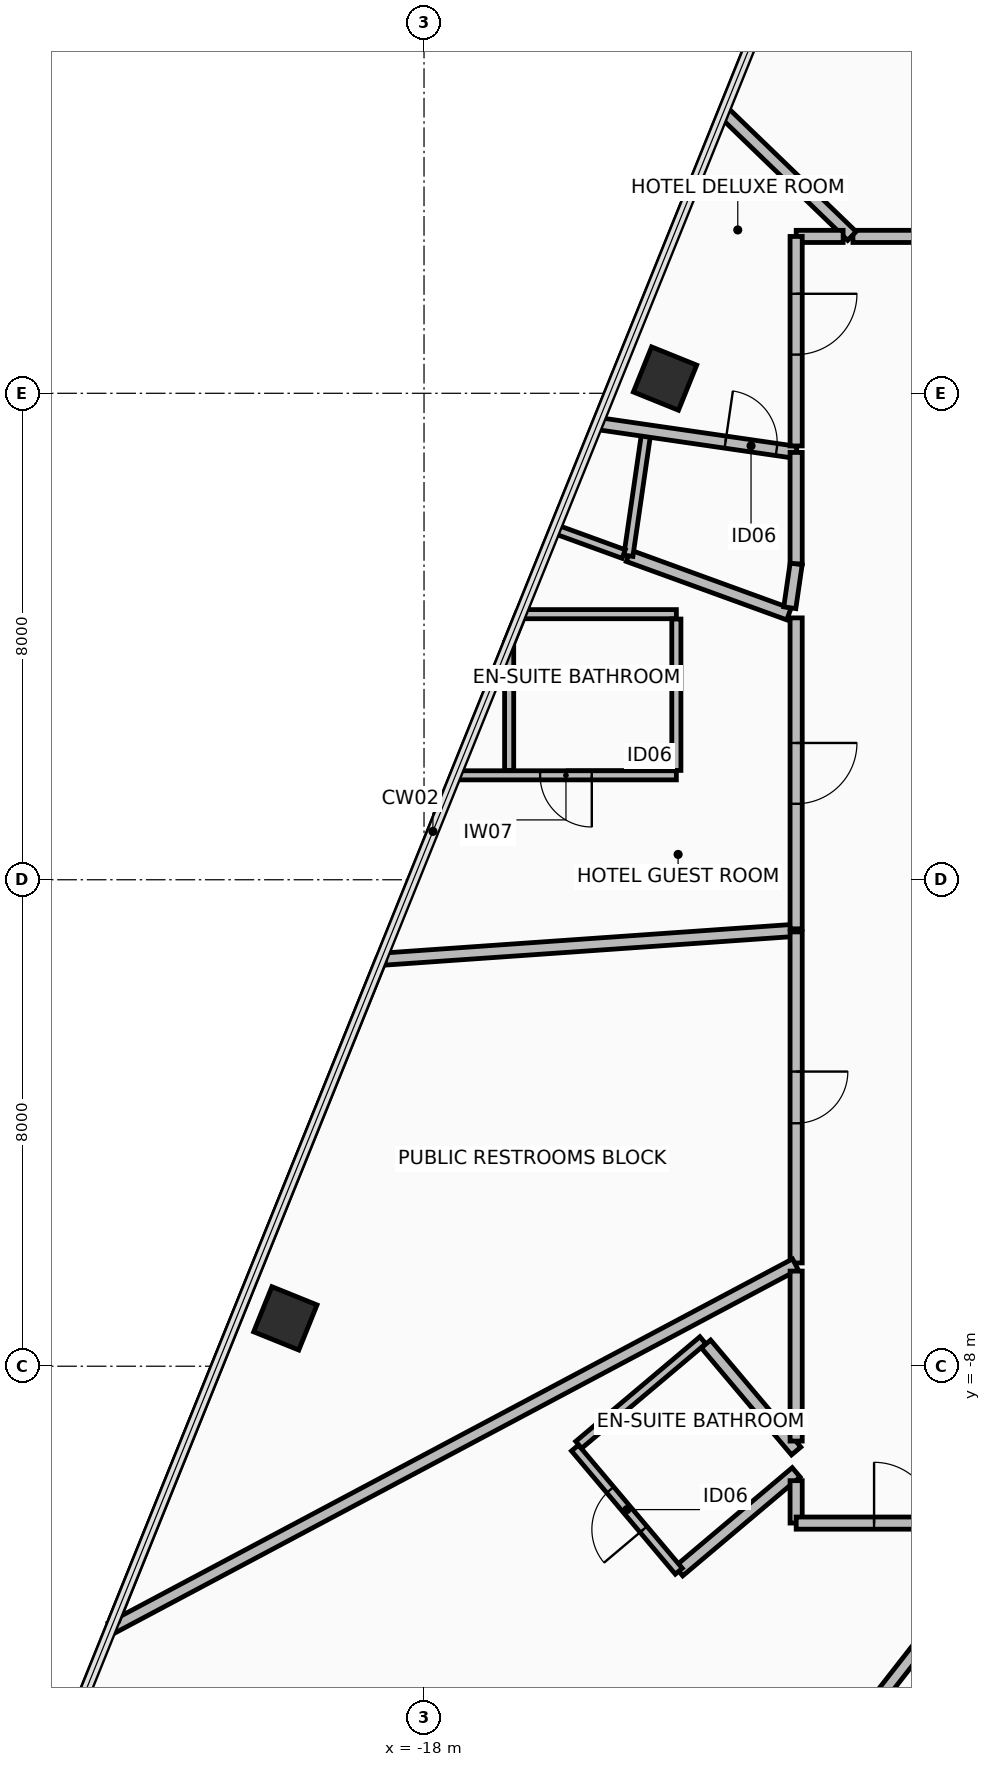
"""IFC4 building model, lengths in metres.
Left out: names, types, materials, properties, quantities, classifications, styles, units other than length and angle.
Written with IfcOpenShell. Run it as: python <this file> out.ifc"""

import sys

from ifc_helpers import new_model, si_unit, direction, frame, frame_2d, origin, origin_2d, place, context, subcontext, project, spatial, rectangle, hollow_rectangle, extrude, element, fill, save


model = new_model("IFC4")
c1 = context("Model", 3, precision=1e-05, world=origin(), true_north=direction((0.0, 1.0)))
c2 = subcontext(c1, "Body", "Model", "MODEL_VIEW")
j1 = project(units=[si_unit("LENGTHUNIT", "METRE"), si_unit("PLANEANGLEUNIT", "RADIAN")], contexts=[c1])
p1 = place(None, origin())
s1 = spatial("IfcSite", under=j1, at=p1, CompositionType="ELEMENT")
p2 = place(p1, origin())
s2 = spatial("IfcBuilding", under=s1, at=p2, CompositionType="ELEMENT")
p3 = place(p2, frame((0.0, 0.0, 77.65)))
s3 = spatial("IfcBuildingStorey", under=s2, at=p3, CompositionType="ELEMENT", Elevation=77.65)
for number, where, z_axis, x_axis in (
    (1, (-14.036, 8.242, 0.0), (0.0, 0.0, 1.0), (0.375, 0.927, 0.0)),
    (2, (-20.281, -7.213, 0.0), (0.0, 0.0, 1.0), (0.375, 0.927, 0.0)),
):
    element("IfcColumn", number, at=place(p3, frame(where, z_axis=z_axis, x_axis=x_axis)), inside=s3, PredefinedType="COLUMN", context=c2, shape_type="SweptSolid", body=[
        extrude(hollow_rectangle(XDim=0.8, YDim=0.8, WallThickness=0.045, at=origin_2d()), origin(), (0.0, 0.0, 1.0), 3.45),
    ])
p4 = place(p3, frame((-12.0, 4.368, 0.0), z_axis=(0.0, 0.0, 1.0), x_axis=(-0.939689330019, 0.342029184499, 0.0)))
e3 = element("IfcWall", 3, at=p4, inside=s3, PredefinedType="PARTITIONING", context=c2, shape_type="SweptSolid", body=[
    extrude(rectangle(XDim=2.809, YDim=0.2, at=frame_2d((1.404, 0.0))), origin(), (0.0, 0.0, 1.0), 2.805),
])
p5 = place(p3, frame((-14.639, 5.328, 0.0), z_axis=(0.0, 0.0, 1.0), x_axis=(0.143755820494, 0.989613189117, 0.0)))
e4 = element("IfcWall", 4, at=p5, inside=s3, PredefinedType="PARTITIONING", context=c2, shape_type="SweptSolid", body=[
    extrude(rectangle(XDim=2.079, YDim=0.15, at=frame_2d((1.039, 0.0))), origin(), (0.0, 0.0, 1.0), 2.405),
])
p6 = place(p3, frame((-15.144, 7.502, 0.0), z_axis=(0.0, 0.0, 1.0), x_axis=(0.989616702709, -0.143731630892, 0.0)))
e5 = element("IfcWall", 5, at=p6, inside=s3, PredefinedType="PARTITIONING", context=c2, shape_type="SweptSolid", body=[
    extrude(rectangle(XDim=3.299, YDim=0.2, at=frame_2d((1.649, 0.0))), origin(), (0.0, 0.0, 1.0), 2.405),
])
p7 = place(p6, frame((2.124, 0.0, 0.0)))
e6 = element("IfcOpeningElement", 6, at=p7, cuts=e5, PredefinedType="OPENING", context=c2, shape_type="SweptSolid", body=[
    extrude(rectangle(XDim=0.85, YDim=2.1, at=frame_2d((0.425, 1.05))), frame((0.0, 0.11, 0.0), z_axis=(0.0, -1.0, 0.0), x_axis=(1.0, 0.0, 0.0)), (0.0, 0.0, 1.0), 0.22),
])
p8 = place(p3, frame((-11.88, 7.028, 0.0), z_axis=(0.0, 0.0, 1.0), x_axis=(0.0, -1.0, 0.0)))
e7 = element("IfcWall", 7, at=p8, inside=s3, PredefinedType="PARTITIONING", context=c2, shape_type="SweptSolid", body=[
    extrude(rectangle(XDim=1.834, YDim=0.2, at=frame_2d((0.917, 0.0))), origin(), (0.0, 0.0, 1.0), 2.805),
])
p9 = place(p3, frame((-11.88, 5.194, 0.0), z_axis=(0.0, 0.0, 1.0), x_axis=(-0.143909981619, -0.989590782693, 0.0)))
e8 = element("IfcWall", 8, at=p9, inside=s3, PredefinedType="PARTITIONING", context=c2, shape_type="SweptSolid", body=[
    extrude(rectangle(XDim=0.728, YDim=0.2, at=frame_2d((0.364, 0.0))), origin(), (0.0, 0.0, 1.0), 3.21),
])
p10 = place(p3, frame((-13.85, 1.718, 0.0), z_axis=(0.0, 0.0, 1.0), x_axis=(-1.0, 0.0, 0.0)))
e9 = element("IfcWall", 9, at=p10, inside=s3, PredefinedType="PARTITIONING", context=c2, shape_type="SweptSolid", body=[
    extrude(rectangle(XDim=3.631, YDim=0.15, at=frame_2d((1.816, 0.0))), origin(), (0.0, 0.0, 1.0), 2.405),
])
p11 = place(p10, frame((1.391, 0.0, 0.0)))
e10 = element("IfcOpeningElement", 10, at=p11, cuts=e9, PredefinedType="OPENING", context=c2, shape_type="SweptSolid", body=[
    extrude(rectangle(XDim=0.85, YDim=2.1, at=frame_2d((0.425, 1.05))), frame((0.0, 0.085, 0.0), z_axis=(0.0, -1.0, 0.0), x_axis=(1.0, 0.0, 0.0)), (0.0, 0.0, 1.0), 0.17),
])
p12 = place(p3, frame((-16.6, 1.798, 0.0), z_axis=(0.0, 0.0, 1.0), x_axis=(0.0, 1.0, 0.0)))
e11 = element("IfcWall", 11, at=p12, inside=s3, PredefinedType="PARTITIONING", context=c2, shape_type="SweptSolid", body=[
    extrude(rectangle(XDim=2.102, YDim=0.15, at=frame_2d((1.051, 0.0))), origin(), (0.0, 0.0, 1.0), 2.405),
])
p13 = place(p3, frame((-16.6, 3.899, 0.0), z_axis=(0.0, 0.0, 1.0), x_axis=(0.374886357565, 0.92707077341, 0.0)))
e12 = element("IfcWall", 12, at=p13, inside=s3, PredefinedType="PARTITIONING", context=c2, shape_type="SweptSolid", body=[
    extrude(rectangle(XDim=0.505, YDim=0.15, at=frame_2d((0.253, 0.0))), origin(), (0.0, 0.0, 1.0), 3.21),
])
p14 = place(p3, frame((-16.411, 4.368, 0.0), z_axis=(0.0, 0.0, 1.0), x_axis=(1.0, 0.0, 0.0)))
e13 = element("IfcWall", 13, at=p14, inside=s3, PredefinedType="PARTITIONING", context=c2, shape_type="SweptSolid", body=[
    extrude(rectangle(XDim=2.561, YDim=0.15, at=frame_2d((1.28, 0.0))), origin(), (0.0, 0.0, 1.0), 2.405),
])
p15 = place(p3, frame((-13.85, 4.288, 0.0), z_axis=(0.0, 0.0, 1.0), x_axis=(0.0, -1.0, 0.0)))
e14 = element("IfcWall", 14, at=p15, inside=s3, PredefinedType="PARTITIONING", context=c2, shape_type="SweptSolid", body=[
    extrude(rectangle(XDim=2.49, YDim=0.15, at=frame_2d((1.245, 0.0))), origin(), (0.0, 0.0, 1.0), 3.21),
])
p16 = place(p3, frame((-11.88, -9.745, 0.0), z_axis=(0.0, 0.0, 1.0), x_axis=(-0.764712982519, -0.644371053328, 0.0)))
e15 = element("IfcWall", 15, at=p16, inside=s3, PredefinedType="PARTITIONING", context=c2, shape_type="SweptSolid", body=[
    extrude(rectangle(XDim=2.524, YDim=0.2, at=frame_2d((1.262, 0.0))), origin(), (0.0, 0.0, 1.0), 3.21),
])
p17 = place(p3, frame((-13.81, -11.371, 0.0), z_axis=(0.0, 0.0, 1.0), x_axis=(-0.644478981733, 0.764622025647, 0.0)))
e16 = element("IfcWall", 16, at=p17, inside=s3, PredefinedType="PARTITIONING", context=c2, shape_type="SweptSolid", body=[
    extrude(rectangle(XDim=2.65, YDim=0.15, at=frame_2d((1.325, 0.0))), origin(), (0.0, 0.0, 1.0), 2.805),
])
p18 = place(p17, frame((0.9, 0.0, 0.0)))
e17 = element("IfcOpeningElement", 17, at=p18, cuts=e16, PredefinedType="OPENING", context=c2, shape_type="SweptSolid", body=[
    extrude(rectangle(XDim=0.85, YDim=2.1, at=frame_2d((0.425, 1.05))), frame((0.0, 0.085, 0.0), z_axis=(0.0, -1.0, 0.0), x_axis=(1.0, 0.0, 0.0)), (0.0, 0.0, 1.0), 0.17),
])
p19 = place(p3, frame((-15.456, -9.293, 0.0), z_axis=(0.0, 0.0, 1.0), x_axis=(0.764709608169, 0.644375057846, 0.0)))
e18 = element("IfcWall", 18, at=p19, inside=s3, PredefinedType="PARTITIONING", context=c2, shape_type="SweptSolid", body=[
    extrude(rectangle(XDim=2.67, YDim=0.15, at=frame_2d((1.335, 0.0))), origin(), (0.0, 0.0, 1.0), 2.605),
])
p20 = place(p3, frame((-13.363, -7.634, 0.0), z_axis=(0.0, 0.0, 1.0), x_axis=(0.644400290836, -0.764688345125, 0.0)))
e19 = element("IfcWall", 19, at=p20, inside=s3, PredefinedType="PARTITIONING", context=c2, shape_type="SweptSolid", body=[
    extrude(rectangle(XDim=2.302, YDim=0.2, at=frame_2d((1.151, 0.0))), origin(), (0.0, 0.0, 1.0), 2.605),
])
p21 = place(p3, frame((-18.688, -1.307, 0.0), z_axis=(0.0, 0.0, 1.0), x_axis=(0.997562443225, 0.069779451603, 0.0)))
e20 = element("IfcWall", 20, at=p21, inside=s3, PredefinedType="PARTITIONING", context=c2, shape_type="SweptSolid", body=[
    extrude(rectangle(XDim=6.798, YDim=0.2, at=frame_2d((3.399, 0.0))), origin(), (0.0, 0.0, 1.0), 2.405),
])
p22 = place(p3, frame((-11.88, -0.857, 0.0), z_axis=(0.0, 0.0, 1.0), x_axis=(0.0, -1.0, 0.0)))
e21 = element("IfcWall", 21, at=p22, inside=s3, PredefinedType="PARTITIONING", context=c2, shape_type="SweptSolid", body=[
    extrude(rectangle(XDim=5.444, YDim=0.2, at=frame_2d((2.722, 0.0))), origin(), (0.0, 0.0, 1.0), 3.21),
])
p23 = place(p22, frame((2.297, 0.0, 0.0)))
e22 = element("IfcOpeningElement", 22, at=p23, cuts=e21, PredefinedType="OPENING", context=c2, shape_type="SweptSolid", body=[
    extrude(rectangle(XDim=0.85, YDim=2.1, at=frame_2d((0.425, 1.05))), frame((0.0, 0.11, 0.0), z_axis=(0.0, -1.0, 0.0), x_axis=(1.0, 0.0, 0.0)), (0.0, 0.0, 1.0), 0.22),
])
p24 = place(p3, frame((-11.893, -6.324, 0.0), z_axis=(0.0, 0.0, 1.0), x_axis=(-0.882946043117, -0.469474477416, 0.0)))
e23 = element("IfcWall", 23, at=p24, inside=s3, PredefinedType="PARTITIONING", context=c2, shape_type="SweptSolid", body=[
    extrude(rectangle(XDim=12.747, YDim=0.2, at=frame_2d((6.374, 0.0))), origin(), (0.0, 0.0, 1.0), 2.405),
])
p25 = place(p3, frame((-23.087, -12.156, 0.0), z_axis=(0.0, 0.0, 1.0), x_axis=(0.374605375648, 0.927184346576, 0.0)))
e24 = element("IfcWall", 24, at=p25, inside=s3, PredefinedType="PARTITIONING", context=c2, shape_type="SweptSolid", body=[
    extrude(rectangle(XDim=11.685, YDim=0.15, at=frame_2d((5.842, 0.0))), origin(), (0.0, 0.0, 1.0), 3.21),
])
p26 = place(p3, frame((-4.312, 10.58, 0.0), z_axis=(0.0, 0.0, 1.0), x_axis=(-1.0, 0.0, 0.0)))
e25 = element("IfcWall", 25, at=p26, inside=s3, PredefinedType="PARTITIONING", context=c2, shape_type="SweptSolid", body=[
    extrude(rectangle(XDim=6.634, YDim=0.2, at=frame_2d((3.317, 0.0))), origin(), (0.0, 0.0, 1.0), 2.605),
])
p27 = place(p26, frame((2.817, 0.0, 0.0)))
e26 = element("IfcOpeningElement", 26, at=p27, cuts=e25, PredefinedType="OPENING", context=c2, shape_type="SweptSolid", body=[
    extrude(rectangle(XDim=1.0, YDim=2.15, at=frame_2d((0.5, 1.075))), frame((0.0, 0.11, 0.0), z_axis=(0.0, -1.0, 0.0), x_axis=(1.0, 0.0, 0.0)), (0.0, 0.0, 1.0), 0.22),
])
p28 = place(p3, frame((-10.963, 10.587, 0.0), z_axis=(0.0, 0.0, 1.0), x_axis=(-0.719299093908, 0.69470052073, 0.0)))
e27 = element("IfcWall", 27, at=p28, inside=s3, PredefinedType="PARTITIONING", context=c2, shape_type="SweptSolid", body=[
    extrude(rectangle(XDim=2.918, YDim=0.2, at=frame_2d((1.459, 0.0))), origin(), (0.0, 0.0, 1.0), 2.405),
])
p29 = place(p3, frame((-11.107, 10.58, 0.0), z_axis=(0.0, 0.0, 1.0), x_axis=(-1.0, 0.0, 0.0)))
e28 = element("IfcWall", 28, at=p29, inside=s3, PredefinedType="PARTITIONING", context=c2, shape_type="SweptSolid", body=[
    extrude(rectangle(XDim=0.772, YDim=0.2, at=frame_2d((0.386, 0.0))), origin(), (0.0, 0.0, 1.0), 3.21),
])
p30 = place(p3, frame((-11.88, 10.579, 0.0), z_axis=(0.0, 0.0, 1.0), x_axis=(0.0, -1.0, 0.0)))
e29 = element("IfcWall", 29, at=p30, inside=s3, PredefinedType="PARTITIONING", context=c2, shape_type="SweptSolid", body=[
    extrude(rectangle(XDim=3.445, YDim=0.2, at=frame_2d((1.723, 0.0))), origin(), (0.0, 0.0, 1.0), 2.605),
])
p31 = place(p30, frame((0.943, 0.0, 0.0)))
e30 = element("IfcOpeningElement", 30, at=p31, cuts=e29, PredefinedType="OPENING", context=c2, shape_type="SweptSolid", body=[
    extrude(rectangle(XDim=1.0, YDim=2.15, at=frame_2d((0.5, 1.075))), frame((0.0, 0.11, 0.0), z_axis=(0.0, -1.0, 0.0), x_axis=(1.0, 0.0, 0.0)), (0.0, 0.0, 1.0), 0.22),
])
p32 = place(p3, frame((-14.716, 5.356, 0.0), z_axis=(0.0, 0.0, 1.0), x_axis=(-0.939690305464, 0.342026504552, 0.0)))
e31 = element("IfcWall", 31, at=p32, inside=s3, PredefinedType="PARTITIONING", context=c2, shape_type="SweptSolid", body=[
    extrude(rectangle(XDim=1.176, YDim=0.15, at=frame_2d((0.588, 0.0))), origin(), (0.0, 0.0, 1.0), 2.405),
])
p33 = place(p3, frame((-11.88, 4.306, 0.0), z_axis=(0.0, 0.0, 1.0), x_axis=(0.0, -1.0, 0.0)))
e32 = element("IfcWall", 32, at=p33, inside=s3, PredefinedType="PARTITIONING", context=c2, shape_type="SweptSolid", body=[
    extrude(rectangle(XDim=5.114, YDim=0.2, at=frame_2d((2.557, 0.0))), origin(), (0.0, 0.0, 1.0), 3.21),
])
p34 = place(p33, frame((2.057, 0.0, 0.0)))
e33 = element("IfcOpeningElement", 33, at=p34, cuts=e32, PredefinedType="OPENING", context=c2, shape_type="SweptSolid", body=[
    extrude(rectangle(XDim=1.0, YDim=2.15, at=frame_2d((0.5, 1.075))), frame((0.0, 0.11, 0.0), z_axis=(0.0, -1.0, 0.0), x_axis=(1.0, 0.0, 0.0)), (0.0, 0.0, 1.0), 0.22),
])
p35 = place(p3, frame((-11.88, -6.436, 0.0), z_axis=(0.0, 0.0, 1.0), x_axis=(0.0, -1.0, 0.0)))
e34 = element("IfcWall", 34, at=p35, inside=s3, PredefinedType="PARTITIONING", context=c2, shape_type="SweptSolid", body=[
    extrude(rectangle(XDim=2.795, YDim=0.2, at=frame_2d((1.397, 0.0))), origin(), (0.0, 0.0, 1.0), 2.605),
])
p36 = place(p3, frame((-11.88, -9.882, 0.0), z_axis=(0.0, 0.0, 1.0), x_axis=(0.0, -1.0, 0.0)))
e35 = element("IfcWall", 35, at=p36, inside=s3, PredefinedType="PARTITIONING", context=c2, shape_type="SweptSolid", body=[
    extrude(rectangle(XDim=0.697, YDim=0.2, at=frame_2d((0.349, 0.0))), origin(), (0.0, 0.0, 1.0), 2.605),
])
p37 = place(p3, frame((-11.879, -10.58, 0.0), z_axis=(0.0, 0.0, 1.0), x_axis=(1.0, 0.0, 0.0)))
e36 = element("IfcWall", 36, at=p37, inside=s3, PredefinedType="PARTITIONING", context=c2, shape_type="SweptSolid", body=[
    extrude(rectangle(XDim=3.562, YDim=0.2, at=frame_2d((1.781, 0.0))), origin(), (0.0, 0.0, 1.0), 2.605),
])
p38 = place(p37, frame((1.281, 0.0, 0.0)))
e37 = element("IfcOpeningElement", 37, at=p38, cuts=e36, PredefinedType="OPENING", context=c2, shape_type="SweptSolid", body=[
    extrude(rectangle(XDim=1.0, YDim=2.15, at=frame_2d((0.5, 1.075))), frame((0.0, 0.11, 0.0), z_axis=(0.0, -1.0, 0.0), x_axis=(1.0, 0.0, 0.0)), (0.0, 0.0, 1.0), 0.22),
])
p39 = place(p3, frame((-8.348, -10.685, 0.0), z_axis=(0.0, 0.0, 1.0), x_axis=(-0.615661230884, -0.788010944585, 0.0)))
e38 = element("IfcWall", 38, at=p39, inside=s3, PredefinedType="PARTITIONING", context=c2, shape_type="SweptSolid", body=[
    extrude(rectangle(XDim=20.121, YDim=0.2, at=frame_2d((10.06, 0.0))), origin(), (0.0, 0.0, 1.0), 2.405),
])
p40 = place(p7, origin())
e39 = element("IfcDoor", 39, at=p40, inside=s3, OperationType="SINGLE_SWING_RIGHT", PredefinedType="DOOR", context=c2, shape_type="SweptSolid", body=[
    extrude(rectangle(XDim=0.85, YDim=2.1, at=frame_2d((0.425, 1.05))), frame((0.0, 0.025, 0.0), z_axis=(0.0, -1.0, 0.0), x_axis=(1.0, 0.0, 0.0)), (0.0, 0.0, 1.0), 0.05),
])
fill(e6, e39)
p41 = place(p11, origin())
e40 = element("IfcDoor", 40, at=p41, inside=s3, OperationType="SINGLE_SWING_RIGHT", PredefinedType="DOOR", context=c2, shape_type="SweptSolid", body=[
    extrude(rectangle(XDim=0.85, YDim=2.1, at=frame_2d((0.425, 1.05))), frame((0.0, 0.025, 0.0), z_axis=(0.0, -1.0, 0.0), x_axis=(1.0, 0.0, 0.0)), (0.0, 0.0, 1.0), 0.05),
])
fill(e10, e40)
p42 = place(p18, origin())
e41 = element("IfcDoor", 41, at=p42, inside=s3, OperationType="SINGLE_SWING_RIGHT", PredefinedType="DOOR", context=c2, shape_type="SweptSolid", body=[
    extrude(rectangle(XDim=0.85, YDim=2.1, at=frame_2d((0.425, 1.05))), frame((0.0, 0.025, 0.0), z_axis=(0.0, -1.0, 0.0), x_axis=(1.0, 0.0, 0.0)), (0.0, 0.0, 1.0), 0.05),
])
fill(e17, e41)
p43 = place(p23, origin())
e42 = element("IfcDoor", 42, at=p43, inside=s3, OperationType="SINGLE_SWING_RIGHT", PredefinedType="DOOR", context=c2, shape_type="SweptSolid", body=[
    extrude(rectangle(XDim=0.85, YDim=2.1, at=frame_2d((0.425, 1.05))), frame((0.0, 0.025, 0.0), z_axis=(0.0, -1.0, 0.0), x_axis=(1.0, 0.0, 0.0)), (0.0, 0.0, 1.0), 0.05),
])
fill(e22, e42)
p44 = place(p31, origin())
e43 = element("IfcDoor", 43, at=p44, inside=s3, OperationType="SINGLE_SWING_LEFT", PredefinedType="DOOR", context=c2, shape_type="SweptSolid", body=[
    extrude(rectangle(XDim=1.0, YDim=2.15, at=frame_2d((0.5, 1.075))), frame((0.0, 0.025, 0.0), z_axis=(0.0, -1.0, 0.0), x_axis=(1.0, 0.0, 0.0)), (0.0, 0.0, 1.0), 0.05),
])
fill(e30, e43)
p45 = place(p34, origin())
e44 = element("IfcDoor", 44, at=p45, inside=s3, OperationType="SINGLE_SWING_LEFT", PredefinedType="DOOR", context=c2, shape_type="SweptSolid", body=[
    extrude(rectangle(XDim=1.0, YDim=2.15, at=frame_2d((0.5, 1.075))), frame((0.0, 0.025, 0.0), z_axis=(0.0, -1.0, 0.0), x_axis=(1.0, 0.0, 0.0)), (0.0, 0.0, 1.0), 0.05),
])
fill(e33, e44)
p46 = place(p38, origin())
e45 = element("IfcDoor", 45, at=p46, inside=s3, OperationType="SINGLE_SWING_LEFT", PredefinedType="DOOR", context=c2, shape_type="SweptSolid", body=[
    extrude(rectangle(XDim=1.0, YDim=2.15, at=frame_2d((0.5, 1.075))), frame((0.0, 0.025, 0.0), z_axis=(0.0, -1.0, 0.0), x_axis=(1.0, 0.0, 0.0)), (0.0, 0.0, 1.0), 0.05),
])
fill(e37, e45)
save(model, sys.argv[1])
